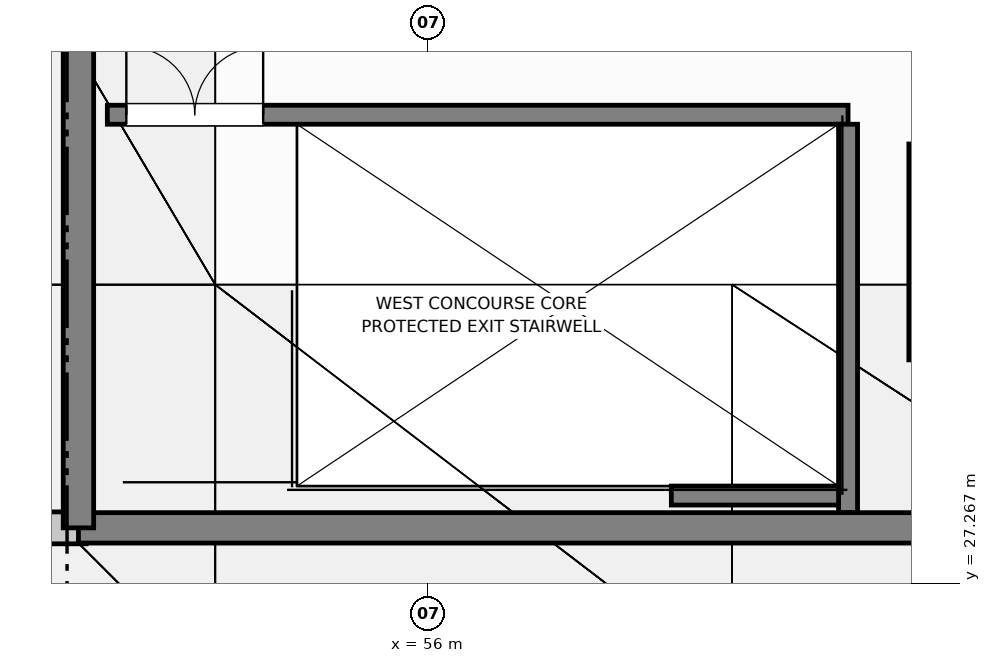
"""IFC4 building model, lengths in metres.
Left out: names, types, materials, properties, quantities, classifications, styles, units other than length and angle.
Written with IfcOpenShell. Run it as: python <this file> out.ifc"""

import sys

from ifc_helpers import new_model, si_unit, direction, frame, frame_2d, origin, place, context, subcontext, project, spatial, rectangle, extrude, element, fill, save


model = new_model("IFC4")
c1 = context("Model", 3, precision=1e-05, world=origin(), true_north=direction((0.0, 1.0)))
c2 = subcontext(c1, "Body", "Model", "MODEL_VIEW")
j1 = project(units=[si_unit("LENGTHUNIT", "METRE"), si_unit("PLANEANGLEUNIT", "RADIAN")], contexts=[c1])
p1 = place(None, origin())
s1 = spatial("IfcSite", under=j1, at=p1, CompositionType="ELEMENT")
p2 = place(p1, origin())
s2 = spatial("IfcBuilding", under=s1, at=p2, CompositionType="ELEMENT")
p3 = place(p2, frame((0.0, 0.0, 11.4)))
s3 = spatial("IfcBuildingStorey", under=s2, at=p3, CompositionType="ELEMENT", Elevation=11.4)
p4 = place(p3, frame((49.8, 28.0, 0.0), z_axis=(0.0, 0.0, 1.0), x_axis=(1.0, 0.0, 0.0)))
e1 = element("IfcWall", 1, at=p4, inside=s3, PredefinedType="STANDARD", context=c2, shape_type="SweptSolid", body=[
    extrude(rectangle(XDim=1.7, YDim=0.42, at=frame_2d((0.85, 0.0))), origin(), (0.0, 0.0, 1.0), 4.4),
])
p5 = place(p3, frame((62.45, 33.05, 0.0), z_axis=(0.0, 0.0, 1.0), x_axis=(0.0, -1.0, 0.0)))
e2 = element("IfcWall", 2, at=p5, inside=s3, PredefinedType="SOLIDWALL", context=c2, shape_type="SweptSolid", body=[
    extrude(rectangle(XDim=2.84, YDim=0.25, at=frame_2d((1.42, 0.0))), origin(), (0.0, 0.0, 1.0), 4.46),
])
p6 = place(p3, frame((51.78, 33.435, 0.0), z_axis=(0.0, 0.0, 1.0), x_axis=(1.0, 0.0, 0.0)))
e3 = element("IfcWall", 3, at=p6, inside=s3, PredefinedType="SOLIDWALL", context=c2, shape_type="SweptSolid", body=[
    extrude(rectangle(XDim=9.745, YDim=0.25, at=frame_2d((4.872, 0.0))), origin(), (0.0, 0.0, 1.0), 4.46),
])
p7 = place(p6, frame((0.25, 0.0, 0.0)))
e4 = element("IfcOpeningElement", 4, at=p7, cuts=e3, PredefinedType="OPENING", context=c2, shape_type="SweptSolid", body=[
    extrude(rectangle(XDim=1.8, YDim=2.25, at=frame_2d((0.9, 1.125))), frame((0.0, 0.135, 0.0), z_axis=(0.0, -1.0, 0.0), x_axis=(1.0, 0.0, 0.0)), (0.0, 0.0, 1.0), 0.27),
])
p8 = place(p3, frame((61.525, 28.2, 0.0), z_axis=(0.0, 0.0, 1.0), x_axis=(0.0, 1.0, 0.0)))
e5 = element("IfcWall", 5, at=p8, inside=s3, PredefinedType="SOLIDWALL", context=c2, shape_type="SweptSolid", body=[
    extrude(rectangle(XDim=5.11, YDim=0.25, at=frame_2d((2.555, 0.0))), origin(), (0.0, 0.0, 1.0), 4.46),
])
p9 = place(p3, frame((59.2, 28.425, 0.0), z_axis=(0.0, 0.0, 1.0), x_axis=(1.0, 0.0, 0.0)))
e6 = element("IfcWall", 6, at=p9, inside=s3, PredefinedType="SOLIDWALL", context=c2, shape_type="SweptSolid", body=[
    extrude(rectangle(XDim=2.2, YDim=0.25, at=frame_2d((1.1, 0.0))), origin(), (0.0, 0.0, 1.0), 4.46),
])
p10 = place(p3, frame((51.4, 28.0, 0.0), z_axis=(0.0, 0.0, 1.0), x_axis=(1.0, 0.0, 0.0)))
e7 = element("IfcWall", 7, at=p10, inside=s3, PredefinedType="SHEAR", context=c2, shape_type="SweptSolid", body=[
    extrude(rectangle(XDim=17.4, YDim=0.4, at=frame_2d((8.7, 0.0))), origin(), (0.0, 0.0, 1.0), 4.46),
])
p11 = place(p3, frame((51.4, 37.0, 0.0), z_axis=(0.0, 0.0, 1.0), x_axis=(0.0, -1.0, 0.0)))
e8 = element("IfcWall", 8, at=p11, inside=s3, PredefinedType="SHEAR", context=c2, shape_type="SweptSolid", body=[
    extrude(rectangle(XDim=9.0, YDim=0.4, at=frame_2d((4.5, 0.0))), origin(), (0.0, 0.0, 1.0), 4.46),
])
p12 = place(p7, origin())
e9 = element("IfcDoor", 9, at=p12, inside=s3, OperationType="DOUBLE_DOOR_SINGLE_SWING", PredefinedType="DOOR", context=c2, shape_type="SweptSolid", body=[
    extrude(rectangle(XDim=1.8, YDim=2.25, at=frame_2d((0.9, 1.125))), frame((0.0, 0.025, 0.0), z_axis=(0.0, -1.0, 0.0), x_axis=(1.0, 0.0, 0.0)), (0.0, 0.0, 1.0), 0.05),
])
fill(e4, e9)
save(model, sys.argv[1])
